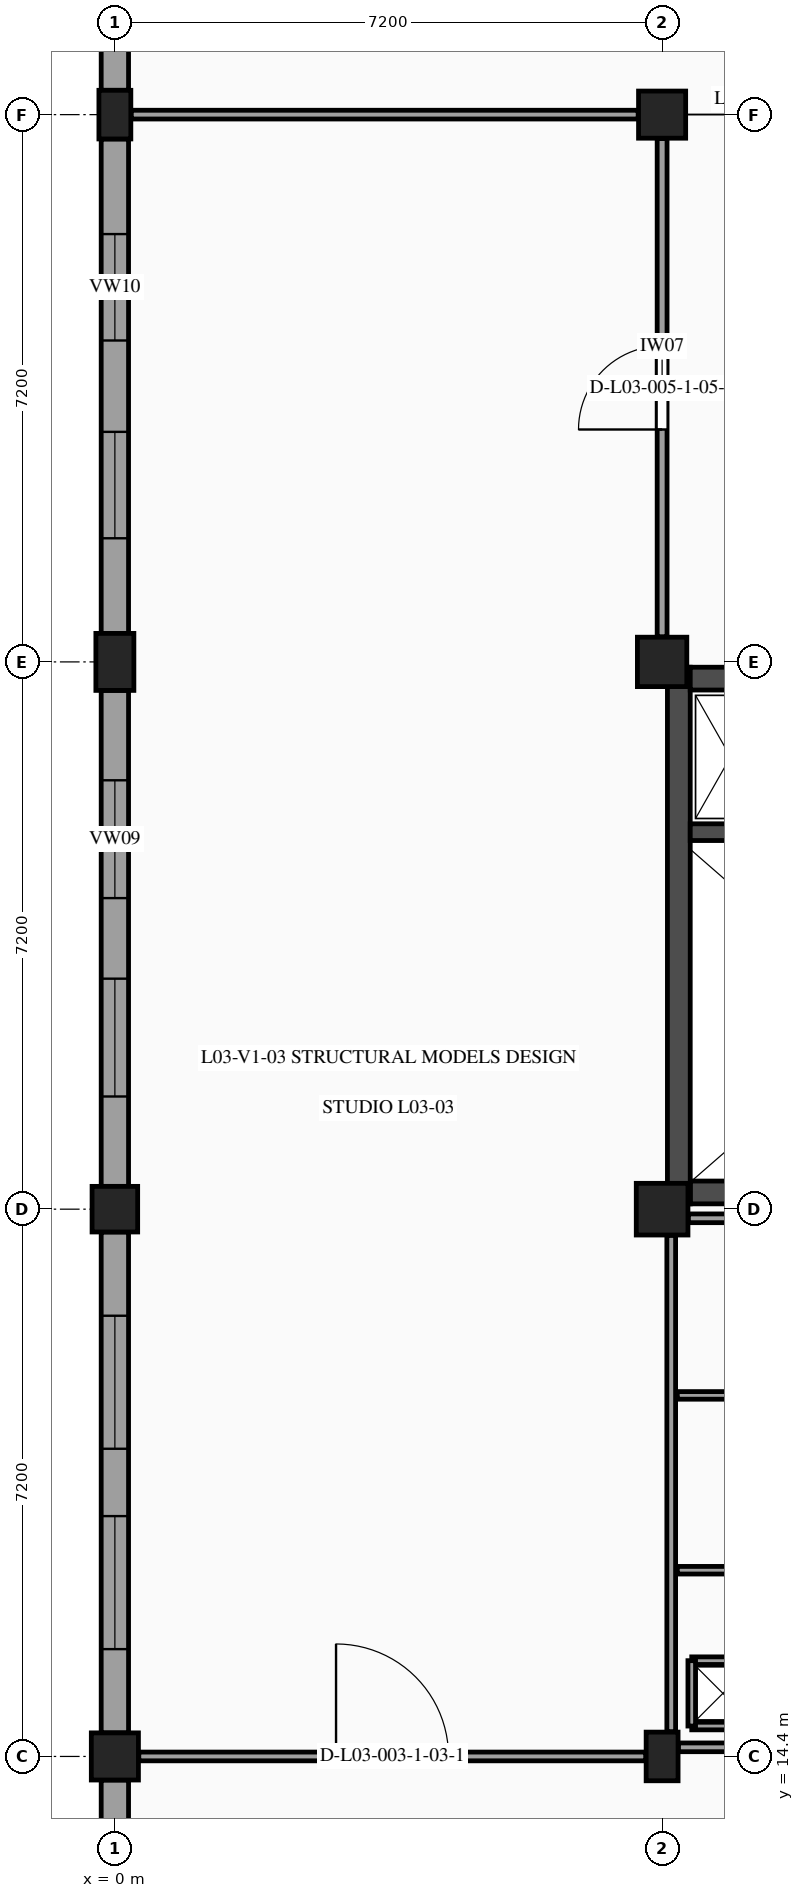
"""IFC4 building model, lengths in metres.
Left out: names, types, materials, properties, quantities, classifications, styles, units other than length and angle.
Written with IfcOpenShell. Run it as: python <this file> out.ifc"""

import sys

from ifc_helpers import new_model, si_unit, direction, frame, frame_2d, origin, origin_2d, place, context, subcontext, project, spatial, rectangle, extrude, element, fill, save


model = new_model("IFC4")
c1 = context("Model", 3, precision=1e-05, world=origin(), true_north=direction((0.0, 1.0)))
c2 = subcontext(c1, "Body", "Model", "MODEL_VIEW")
j1 = project(units=[si_unit("LENGTHUNIT", "METRE"), si_unit("PLANEANGLEUNIT", "RADIAN")], contexts=[c1])
p1 = place(None, origin())
s1 = spatial("IfcSite", under=j1, at=p1, CompositionType="ELEMENT")
p2 = place(p1, origin())
s2 = spatial("IfcBuilding", under=s1, at=p2, CompositionType="ELEMENT")
p3 = place(p2, frame((0.0, 0.0, 14.4)))
s3 = spatial("IfcBuildingStorey", under=s2, at=p3, CompositionType="ELEMENT", Elevation=14.4)
p4 = place(p3, frame((0.0, 14.4, 0.0), z_axis=(0.0, 0.0, 1.0), x_axis=(1.0, 0.0, 0.0)))
e1 = element("IfcColumn", 1, at=p4, inside=s3, PredefinedType="COLUMN", context=c2, shape_type="SweptSolid", body=[
    extrude(rectangle(XDim=0.62, YDim=0.62, at=origin_2d()), origin(), (0.0, 0.0, 1.0), 4.2),
])
p5 = place(p3, frame((0.0, 21.6, 0.0), z_axis=(0.0, 0.0, 1.0), x_axis=(1.0, 0.0, 0.0)))
e2 = element("IfcColumn", 2, at=p5, inside=s3, PredefinedType="COLUMN", context=c2, shape_type="SweptSolid", body=[
    extrude(rectangle(XDim=0.6, YDim=0.6, at=origin_2d()), origin(), (0.0, 0.0, 1.0), 4.2),
])
p6 = place(p3, frame((0.0, 28.8, 0.0), z_axis=(0.0, 0.0, 1.0), x_axis=(1.0, 0.0, 0.0)))
e3 = element("IfcColumn", 3, at=p6, inside=s3, PredefinedType="COLUMN", context=c2, shape_type="SweptSolid", body=[
    extrude(rectangle(XDim=0.5, YDim=0.75, at=origin_2d()), origin(), (0.0, 0.0, 1.0), 4.2),
])
for number, where, z_axis, x_axis in (
    (4, (0.0, 36.0, 0.0), (0.0, 0.0, 1.0), (1.0, 0.0, 0.0)),
    (5, (7.2, 14.4, 0.0), (0.0, 0.0, 1.0), (1.0, 0.0, 0.0)),
):
    element("IfcColumn", number, at=place(p3, frame(where, z_axis=z_axis, x_axis=x_axis)), inside=s3, PredefinedType="PILASTER", context=c2, shape_type="SweptSolid", body=[
        extrude(rectangle(XDim=0.42, YDim=0.64, at=origin_2d()), origin(), (0.0, 0.0, 1.0), 4.2),
    ])
p7 = place(p3, frame((7.2, 21.6, 0.0), z_axis=(0.0, 0.0, 1.0), x_axis=(1.0, 0.0, 0.0)))
e6 = element("IfcColumn", 6, at=p7, inside=s3, PredefinedType="COLUMN", context=c2, shape_type="SweptSolid", body=[
    extrude(rectangle(XDim=0.68, YDim=0.68, at=origin_2d()), origin(), (0.0, 0.0, 1.0), 4.2),
])
p8 = place(p3, frame((7.2, 28.8, 0.0), z_axis=(0.0, 0.0, 1.0), x_axis=(1.0, 0.0, 0.0)))
e7 = element("IfcColumn", 7, at=p8, inside=s3, PredefinedType="COLUMN", context=c2, shape_type="SweptSolid", body=[
    extrude(rectangle(XDim=0.65, YDim=0.65, at=origin_2d()), origin(), (0.0, 0.0, 1.0), 4.2),
])
p9 = place(p3, frame((7.2, 36.0, 0.0), z_axis=(0.0, 0.0, 1.0), x_axis=(1.0, 0.0, 0.0)))
e8 = element("IfcColumn", 8, at=p9, inside=s3, PredefinedType="COLUMN", context=c2, shape_type="SweptSolid", body=[
    extrude(rectangle(XDim=0.62, YDim=0.62, at=origin_2d()), origin(), (0.0, 0.0, 1.0), 4.2),
])
p10 = place(p3, frame((0.0, 7.525, 0.0), z_axis=(0.0, 0.0, 1.0), x_axis=(0.0, 1.0, 0.0)))
e9 = element("IfcWall", 9, at=p10, inside=s3, PredefinedType="STANDARD", context=c2, shape_type="SweptSolid", body=[
    extrude(rectangle(XDim=6.565, YDim=0.36, at=frame_2d((3.283, 0.0))), origin(), (0.0, 0.0, 1.0), 3.135),
])
p11 = place(p10, frame((0.994, 0.0, 1.15)))
e10 = element("IfcOpeningElement", 10, at=p11, cuts=e9, PredefinedType="OPENING", context=c2, shape_type="SweptSolid", body=[
    extrude(rectangle(XDim=1.95, YDim=1.4, at=frame_2d((0.975, 0.7))), frame((0.0, 0.19, 0.0), z_axis=(0.0, -1.0, 0.0), x_axis=(1.0, 0.0, 0.0)), (0.0, 0.0, 1.0), 0.38),
])
p12 = place(p10, frame((3.621, 0.0, 1.15)))
e11 = element("IfcOpeningElement", 11, at=p12, cuts=e9, PredefinedType="OPENING", context=c2, shape_type="SweptSolid", body=[
    extrude(rectangle(XDim=1.95, YDim=1.4, at=frame_2d((0.975, 0.7))), frame((0.0, 0.19, 0.0), z_axis=(0.0, -1.0, 0.0), x_axis=(1.0, 0.0, 0.0)), (0.0, 0.0, 1.0), 0.38),
])
p13 = place(p3, frame((0.0, 14.71, 0.0), z_axis=(0.0, 0.0, 1.0), x_axis=(0.0, 1.0, 0.0)))
e12 = element("IfcWall", 12, at=p13, inside=s3, PredefinedType="STANDARD", context=c2, shape_type="SweptSolid", body=[
    extrude(rectangle(XDim=6.59, YDim=0.36, at=frame_2d((3.295, 0.0))), origin(), (0.0, 0.0, 1.0), 3.135),
])
p14 = place(p13, frame((1.102, 0.0, 1.15)))
e13 = element("IfcOpeningElement", 13, at=p14, cuts=e12, PredefinedType="OPENING", context=c2, shape_type="SweptSolid", body=[
    extrude(rectangle(XDim=1.75, YDim=1.4, at=frame_2d((0.875, 0.7))), frame((0.0, 0.19, 0.0), z_axis=(0.0, -1.0, 0.0), x_axis=(1.0, 0.0, 0.0)), (0.0, 0.0, 1.0), 0.38),
])
p15 = place(p13, frame((3.738, 0.0, 1.15)))
e14 = element("IfcOpeningElement", 14, at=p15, cuts=e12, PredefinedType="OPENING", context=c2, shape_type="SweptSolid", body=[
    extrude(rectangle(XDim=1.75, YDim=1.4, at=frame_2d((0.875, 0.7))), frame((0.0, 0.19, 0.0), z_axis=(0.0, -1.0, 0.0), x_axis=(1.0, 0.0, 0.0)), (0.0, 0.0, 1.0), 0.38),
])
p16 = place(p3, frame((0.0, 21.9, 0.0), z_axis=(0.0, 0.0, 1.0), x_axis=(0.0, 1.0, 0.0)))
e15 = element("IfcWall", 15, at=p16, inside=s3, PredefinedType="STANDARD", context=c2, shape_type="SweptSolid", body=[
    extrude(rectangle(XDim=6.525, YDim=0.36, at=frame_2d((3.263, 0.0))), origin(), (0.0, 0.0, 1.0), 3.135),
])
p17 = place(p16, frame((1.183, 0.0, 1.15)))
e16 = element("IfcOpeningElement", 16, at=p17, cuts=e15, PredefinedType="OPENING", context=c2, shape_type="SweptSolid", body=[
    extrude(rectangle(XDim=1.55, YDim=1.35, at=frame_2d((0.775, 0.675))), frame((0.0, 0.19, 0.0), z_axis=(0.0, -1.0, 0.0), x_axis=(1.0, 0.0, 0.0)), (0.0, 0.0, 1.0), 0.38),
])
p18 = place(p16, frame((3.792, 0.0, 1.15)))
e17 = element("IfcOpeningElement", 17, at=p18, cuts=e15, PredefinedType="OPENING", context=c2, shape_type="SweptSolid", body=[
    extrude(rectangle(XDim=1.55, YDim=1.35, at=frame_2d((0.775, 0.675))), frame((0.0, 0.19, 0.0), z_axis=(0.0, -1.0, 0.0), x_axis=(1.0, 0.0, 0.0)), (0.0, 0.0, 1.0), 0.38),
])
p19 = place(p3, frame((0.0, 29.175, 0.0), z_axis=(0.0, 0.0, 1.0), x_axis=(0.0, 1.0, 0.0)))
e18 = element("IfcWall", 18, at=p19, inside=s3, PredefinedType="STANDARD", context=c2, shape_type="SweptSolid", body=[
    extrude(rectangle(XDim=6.505, YDim=0.36, at=frame_2d((3.252, 0.0))), origin(), (0.0, 0.0, 1.0), 3.135),
])
p20 = place(p19, frame((1.251, 0.0, 1.15)))
e19 = element("IfcOpeningElement", 19, at=p20, cuts=e18, PredefinedType="OPENING", context=c2, shape_type="SweptSolid", body=[
    extrude(rectangle(XDim=1.4, YDim=1.3, at=frame_2d((0.7, 0.65))), frame((0.0, 0.19, 0.0), z_axis=(0.0, -1.0, 0.0), x_axis=(1.0, 0.0, 0.0)), (0.0, 0.0, 1.0), 0.38),
])
p21 = place(p19, frame((3.854, 0.0, 1.15)))
e20 = element("IfcOpeningElement", 20, at=p21, cuts=e18, PredefinedType="OPENING", context=c2, shape_type="SweptSolid", body=[
    extrude(rectangle(XDim=1.4, YDim=1.3, at=frame_2d((0.7, 0.65))), frame((0.0, 0.19, 0.0), z_axis=(0.0, -1.0, 0.0), x_axis=(1.0, 0.0, 0.0)), (0.0, 0.0, 1.0), 0.38),
])
p22 = place(p3, frame((0.0, 36.32, 0.0), z_axis=(0.0, 0.0, 1.0), x_axis=(0.0, 1.0, 0.0)))
e21 = element("IfcWall", 21, at=p22, inside=s3, PredefinedType="STANDARD", context=c2, shape_type="SweptSolid", body=[
    extrude(rectangle(XDim=6.54, YDim=0.36, at=frame_2d((3.27, 0.0))), origin(), (0.0, 0.0, 1.0), 3.135),
])
p23 = place(p22, frame((1.337, 0.0, 1.15)))
e22 = element("IfcOpeningElement", 22, at=p23, cuts=e21, PredefinedType="OPENING", context=c2, shape_type="SweptSolid", body=[
    extrude(rectangle(XDim=1.25, YDim=1.25, at=frame_2d((0.625, 0.625))), frame((0.0, 0.19, 0.0), z_axis=(0.0, -1.0, 0.0), x_axis=(1.0, 0.0, 0.0)), (0.0, 0.0, 1.0), 0.38),
])
p24 = place(p22, frame((3.953, 0.0, 1.15)))
e23 = element("IfcOpeningElement", 23, at=p24, cuts=e21, PredefinedType="OPENING", context=c2, shape_type="SweptSolid", body=[
    extrude(rectangle(XDim=1.25, YDim=1.25, at=frame_2d((0.625, 0.625))), frame((0.0, 0.19, 0.0), z_axis=(0.0, -1.0, 0.0), x_axis=(1.0, 0.0, 0.0)), (0.0, 0.0, 1.0), 0.38),
])
p25 = place(p3, frame((7.57, 21.82, 0.0), z_axis=(0.0, 0.0, 1.0), x_axis=(1.0, 0.0, 0.0)))
e24 = element("IfcWall", 24, at=p25, inside=s3, PredefinedType="SHEAR", context=c2, shape_type="SweptSolid", body=[
    extrude(rectangle(XDim=6.54, YDim=0.3, at=frame_2d((3.27, 0.0))), origin(), (0.0, 0.0, 1.0), 3.94),
])
p26 = place(p3, frame((7.42, 28.73, 0.0), z_axis=(0.0, 0.0, 1.0), x_axis=(0.0, -1.0, 0.0)))
e25 = element("IfcWall", 25, at=p26, inside=s3, PredefinedType="SHEAR", context=c2, shape_type="SweptSolid", body=[
    extrude(rectangle(XDim=7.06, YDim=0.3, at=frame_2d((3.53, 0.0))), origin(), (0.0, 0.0, 1.0), 3.94),
])
p27 = place(p3, frame((7.57, 28.58, 0.0), z_axis=(0.0, 0.0, 1.0), x_axis=(1.0, 0.0, 0.0)))
e26 = element("IfcWall", 26, at=p27, inside=s3, PredefinedType="SHEAR", context=c2, shape_type="SweptSolid", body=[
    extrude(rectangle(XDim=6.54, YDim=0.3, at=frame_2d((3.27, 0.0))), origin(), (0.0, 0.0, 1.0), 3.94),
])
p28 = place(p27, frame((1.42, 0.0, 0.0)))
e27 = element("IfcOpeningElement", 27, at=p28, cuts=e26, PredefinedType="OPENING", context=c2, shape_type="SweptSolid", body=[
    extrude(rectangle(XDim=0.85, YDim=2.1, at=frame_2d((0.425, 1.05))), frame((0.0, 0.16, 0.0), z_axis=(0.0, -1.0, 0.0), x_axis=(1.0, 0.0, 0.0)), (0.0, 0.0, 1.0), 0.32),
])
p29 = place(p3, frame((7.57, 26.56, 0.0), z_axis=(0.0, 0.0, 1.0), x_axis=(1.0, 0.0, 0.0)))
e28 = element("IfcWall", 28, at=p29, inside=s3, PredefinedType="SHEAR", context=c2, shape_type="SweptSolid", body=[
    extrude(rectangle(XDim=6.54, YDim=0.22, at=frame_2d((3.27, 0.0))), origin(), (0.0, 0.0, 1.0), 3.94),
])
p30 = place(p29, frame((5.2, 0.0, 0.0)))
e29 = element("IfcOpeningElement", 29, at=p30, cuts=e28, PredefinedType="OPENING", context=c2, shape_type="SweptSolid", body=[
    extrude(rectangle(XDim=1.2, YDim=2.2, at=frame_2d((0.6, 1.1))), frame((0.0, 0.12, 0.0), z_axis=(0.0, -1.0, 0.0), x_axis=(1.0, 0.0, 0.0)), (0.0, 0.0, 1.0), 0.24),
])
p31 = place(p3, frame((7.415, 14.52, 0.0), z_axis=(0.0, 0.0, 1.0), x_axis=(1.0, 0.0, 0.0)))
e30 = element("IfcWall", 30, at=p31, inside=s3, PredefinedType="PARTITIONING", context=c2, shape_type="SweptSolid", body=[
    extrude(rectangle(XDim=6.67, YDim=0.115, at=frame_2d((3.335, 0.0))), origin(), (0.0, 0.0, 1.0), 3.22),
])
p32 = place(p3, frame((7.545, 21.48, 0.0), z_axis=(0.0, 0.0, 1.0), x_axis=(1.0, 0.0, 0.0)))
e31 = element("IfcWall", 31, at=p32, inside=s3, PredefinedType="PARTITIONING", context=c2, shape_type="SweptSolid", body=[
    extrude(rectangle(XDim=6.55, YDim=0.115, at=frame_2d((3.275, 0.0))), origin(), (0.0, 0.0, 1.0), 3.22),
])
p33 = place(p3, frame((7.32, 14.725, 0.0), z_axis=(0.0, 0.0, 1.0), x_axis=(0.0, 1.0, 0.0)))
e32 = element("IfcWall", 32, at=p33, inside=s3, PredefinedType="PARTITIONING", context=c2, shape_type="SweptSolid", body=[
    extrude(rectangle(XDim=6.53, YDim=0.115, at=frame_2d((3.265, 0.0))), origin(), (0.0, 0.0, 1.0), 3.245),
])
for number, where, z_axis, x_axis in (
    (33, (7.4, 16.85, 0.0), (0.0, 0.0, 1.0), (1.0, 0.0, 0.0)),
    (34, (7.4, 19.15, 0.0), (0.0, 0.0, 1.0), (1.0, 0.0, 0.0)),
):
    element("IfcWall", number, at=place(p3, frame(where, z_axis=z_axis, x_axis=x_axis)), inside=s3, PredefinedType="PARTITIONING", context=c2, shape_type="SweptSolid", body=[
        extrude(rectangle(XDim=6.8, YDim=0.1, at=frame_2d((3.4, 0.0))), origin(), (0.0, 0.0, 1.0), 3.94),
    ])
for number, where, z_axis, x_axis in (
    (35, (7.59, 14.8, 0.0), (0.0, 0.0, 1.0), (1.0, 0.0, 0.0)),
    (36, (8.41, 15.66, 0.0), (0.0, 0.0, 1.0), (-1.0, 0.0, 0.0)),
):
    element("IfcWall", number, at=place(p3, frame(where, z_axis=z_axis, x_axis=x_axis)), inside=s3, PredefinedType="PARTITIONING", context=c2, shape_type="SweptSolid", body=[
        extrude(rectangle(XDim=0.82, YDim=0.1, at=frame_2d((0.41, 0.0))), origin(), (0.0, 0.0, 1.0), 3.94),
    ])
p34 = place(p3, frame((7.59, 15.66, 0.0), z_axis=(0.0, 0.0, 1.0), x_axis=(0.0, -1.0, 0.0)))
e37 = element("IfcWall", 37, at=p34, inside=s3, PredefinedType="PARTITIONING", context=c2, shape_type="SweptSolid", body=[
    extrude(rectangle(XDim=0.86, YDim=0.1, at=frame_2d((0.43, 0.0))), origin(), (0.0, 0.0, 1.0), 3.94),
])
p35 = place(p3, frame((0.315, 14.4, 0.0), z_axis=(0.0, 0.0, 1.0), x_axis=(1.0, 0.0, 0.0)))
e38 = element("IfcWall", 38, at=p35, inside=s3, PredefinedType="PARTITIONING", context=c2, shape_type="SweptSolid", body=[
    extrude(rectangle(XDim=6.67, YDim=0.115, at=frame_2d((3.335, 0.0))), origin(), (0.0, 0.0, 1.0), 3.215),
])
p36 = place(p35, frame((2.595, 0.0, 0.0)))
e39 = element("IfcOpeningElement", 39, at=p36, cuts=e38, PredefinedType="OPENING", context=c2, shape_type="SweptSolid", body=[
    extrude(rectangle(XDim=1.48, YDim=2.28, at=frame_2d((0.74, 1.14))), frame((0.0, 0.067, 0.0), z_axis=(0.0, -1.0, 0.0), x_axis=(1.0, 0.0, 0.0)), (0.0, 0.0, 1.0), 0.135),
])
p37 = place(p3, frame((7.2, 29.13, 0.0), z_axis=(0.0, 0.0, 1.0), x_axis=(0.0, 1.0, 0.0)))
e40 = element("IfcWall", 40, at=p37, inside=s3, PredefinedType="PARTITIONING", context=c2, shape_type="SweptSolid", body=[
    extrude(rectangle(XDim=6.555, YDim=0.13, at=frame_2d((3.278, 0.0))), origin(), (0.0, 0.0, 1.0), 3.305),
])
p38 = place(p37, frame((2.728, 0.0, 0.0)))
e41 = element("IfcOpeningElement", 41, at=p38, cuts=e40, PredefinedType="OPENING", context=c2, shape_type="SweptSolid", body=[
    extrude(rectangle(XDim=1.1, YDim=2.15, at=frame_2d((0.55, 1.075))), frame((0.0, 0.075, 0.0), z_axis=(0.0, -1.0, 0.0), x_axis=(1.0, 0.0, 0.0)), (0.0, 0.0, 1.0), 0.15),
])
p39 = place(p3, frame((0.215, 36.0, 0.0), z_axis=(0.0, 0.0, 1.0), x_axis=(1.0, 0.0, 0.0)))
e42 = element("IfcWall", 42, at=p39, inside=s3, PredefinedType="PARTITIONING", context=c2, shape_type="SweptSolid", body=[
    extrude(rectangle(XDim=6.67, YDim=0.115, at=frame_2d((3.335, 0.0))), origin(), (0.0, 0.0, 1.0), 3.215),
])
p40 = place(p14, origin())
e43 = element("IfcWindow", 43, at=p40, inside=s3, PartitioningType="SINGLE_PANEL", PredefinedType="WINDOW", context=c2, shape_type="SweptSolid", body=[
    extrude(rectangle(XDim=1.75, YDim=1.4, at=frame_2d((0.875, 0.7))), frame((0.0, -0.08, 0.0), z_axis=(0.0, -1.0, 0.0), x_axis=(1.0, 0.0, 0.0)), (0.0, 0.0, 1.0), 0.06),
])
fill(e13, e43)
p41 = place(p15, origin())
e44 = element("IfcWindow", 44, at=p41, inside=s3, PartitioningType="SINGLE_PANEL", PredefinedType="WINDOW", context=c2, shape_type="SweptSolid", body=[
    extrude(rectangle(XDim=1.75, YDim=1.4, at=frame_2d((0.875, 0.7))), frame((0.0, -0.08, 0.0), z_axis=(0.0, -1.0, 0.0), x_axis=(1.0, 0.0, 0.0)), (0.0, 0.0, 1.0), 0.06),
])
fill(e14, e44)
p42 = place(p17, origin())
e45 = element("IfcWindow", 45, at=p42, inside=s3, PartitioningType="SINGLE_PANEL", PredefinedType="WINDOW", context=c2, shape_type="SweptSolid", body=[
    extrude(rectangle(XDim=1.55, YDim=1.35, at=frame_2d((0.775, 0.675))), frame((0.0, -0.08, 0.0), z_axis=(0.0, -1.0, 0.0), x_axis=(1.0, 0.0, 0.0)), (0.0, 0.0, 1.0), 0.06),
])
fill(e16, e45)
p43 = place(p18, origin())
e46 = element("IfcWindow", 46, at=p43, inside=s3, PartitioningType="SINGLE_PANEL", PredefinedType="WINDOW", context=c2, shape_type="SweptSolid", body=[
    extrude(rectangle(XDim=1.55, YDim=1.35, at=frame_2d((0.775, 0.675))), frame((0.0, -0.08, 0.0), z_axis=(0.0, -1.0, 0.0), x_axis=(1.0, 0.0, 0.0)), (0.0, 0.0, 1.0), 0.06),
])
fill(e17, e46)
p44 = place(p20, origin())
e47 = element("IfcWindow", 47, at=p44, inside=s3, PartitioningType="SINGLE_PANEL", PredefinedType="WINDOW", context=c2, shape_type="SweptSolid", body=[
    extrude(rectangle(XDim=1.4, YDim=1.3, at=frame_2d((0.7, 0.65))), frame((0.0, -0.08, 0.0), z_axis=(0.0, -1.0, 0.0), x_axis=(1.0, 0.0, 0.0)), (0.0, 0.0, 1.0), 0.06),
])
fill(e19, e47)
p45 = place(p21, origin())
e48 = element("IfcWindow", 48, at=p45, inside=s3, PartitioningType="SINGLE_PANEL", PredefinedType="WINDOW", context=c2, shape_type="SweptSolid", body=[
    extrude(rectangle(XDim=1.4, YDim=1.3, at=frame_2d((0.7, 0.65))), frame((0.0, -0.08, 0.0), z_axis=(0.0, -1.0, 0.0), x_axis=(1.0, 0.0, 0.0)), (0.0, 0.0, 1.0), 0.06),
])
fill(e20, e48)
p46 = place(p36, origin())
e49 = element("IfcDoor", 49, at=p46, inside=s3, OperationType="SINGLE_SWING_LEFT", PredefinedType="DOOR", context=c2, shape_type="SweptSolid", body=[
    extrude(rectangle(XDim=1.48, YDim=2.28, at=frame_2d((0.74, 1.14))), frame((0.0, 0.025, 0.0), z_axis=(0.0, -1.0, 0.0), x_axis=(1.0, 0.0, 0.0)), (0.0, 0.0, 1.0), 0.05),
])
fill(e39, e49)
p47 = place(p38, origin())
e50 = element("IfcDoor", 50, at=p47, inside=s3, OperationType="SINGLE_SWING_LEFT", PredefinedType="DOOR", context=c2, shape_type="SweptSolid", body=[
    extrude(rectangle(XDim=1.1, YDim=2.15, at=frame_2d((0.55, 1.075))), frame((0.0, 0.025, 0.0), z_axis=(0.0, -1.0, 0.0), x_axis=(1.0, 0.0, 0.0)), (0.0, 0.0, 1.0), 0.05),
])
fill(e41, e50)
save(model, sys.argv[1])
